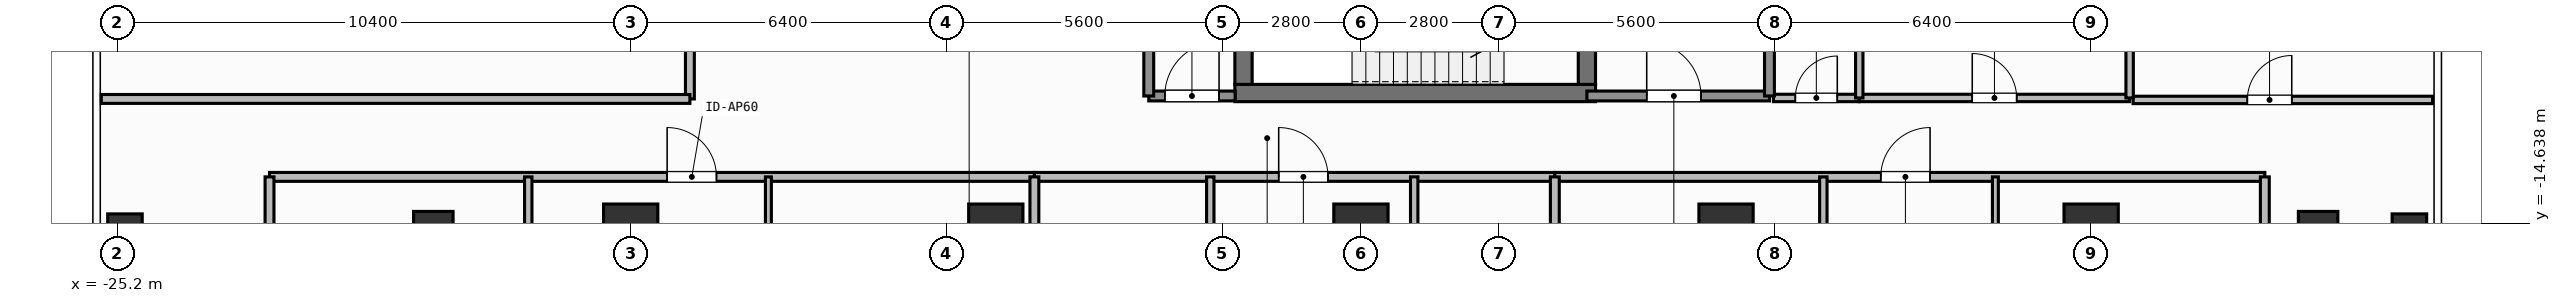
"""IFC4 building model, lengths in metres.
Left out: names, types, materials, properties, quantities, classifications, styles, units other than length and angle.
Written with IfcOpenShell. Run it as: python <this file> out.ifc"""

import sys

from ifc_helpers import new_model, si_unit, direction, frame, frame_2d, origin, origin_2d, place, context, subcontext, project, spatial, rectangle, hollow_rectangle, extrude, element, fill, save


model = new_model("IFC4")
c1 = context("Model", 3, precision=1e-05, world=origin(), true_north=direction((0.0, 1.0)))
c2 = subcontext(c1, "Body", "Model", "MODEL_VIEW")
j1 = project(units=[si_unit("LENGTHUNIT", "METRE"), si_unit("PLANEANGLEUNIT", "RADIAN")], contexts=[c1])
p1 = place(None, origin())
s1 = spatial("IfcSite", under=j1, at=p1, CompositionType="ELEMENT")
p2 = place(p1, origin())
s2 = spatial("IfcBuilding", under=s1, at=p2, CompositionType="ELEMENT")
p3 = place(p2, frame((0.0, 0.0, 183.6)))
s3 = spatial("IfcBuildingStorey", under=s2, at=p3, CompositionType="ELEMENT", Elevation=183.6)
p4 = place(p3, frame((-2.555, -12.0, 0.0), z_axis=(0.0, 0.0, 1.0), x_axis=(1.0, 0.0, 0.0)))
e1 = element("IfcWall", 1, at=p4, inside=s3, PredefinedType="SHEAR", context=c2, shape_type="SweptSolid", body=[
    extrude(rectangle(XDim=7.31, YDim=0.35, at=frame_2d((3.655, 0.0))), origin(), (0.0, 0.0, 1.0), 3.9),
])
p5 = place(p3, frame((-2.38, -11.825, 0.0), z_axis=(0.0, 0.0, 1.0), x_axis=(0.0, 1.0, 0.0)))
e2 = element("IfcWall", 2, at=p5, inside=s3, PredefinedType="SHEAR", context=c2, shape_type="SweptSolid", body=[
    extrude(rectangle(XDim=2.925, YDim=0.35, at=frame_2d((1.462, 0.0))), origin(), (0.0, 0.0, 1.0), 3.9),
])
p6 = place(p3, frame((4.58, -8.9, 0.0), z_axis=(0.0, 0.0, 1.0), x_axis=(0.0, -1.0, 0.0)))
e3 = element("IfcWall", 3, at=p6, inside=s3, PredefinedType="SHEAR", context=c2, shape_type="SweptSolid", body=[
    extrude(rectangle(XDim=2.925, YDim=0.35, at=frame_2d((1.462, 0.0))), origin(), (0.0, 0.0, 1.0), 3.9),
])
p7 = place(p6, frame((0.913, 0.0, 0.0)))
e4 = element("IfcOpeningElement", 4, at=p7, cuts=e3, PredefinedType="OPENING", context=c2, shape_type="SweptSolid", body=[
    extrude(rectangle(XDim=1.1, YDim=2.15, at=frame_2d((0.55, 1.075))), frame((0.0, 0.185, 0.0), z_axis=(0.0, -1.0, 0.0), x_axis=(1.0, 0.0, 0.0)), (0.0, 0.0, 1.0), 0.37),
])
for number, where, z_axis, x_axis in (
    (5, (-14.8, -14.8, 0.0), (0.0, 0.0, 1.0), (1.0, 0.0, 0.0)),
    (6, (-7.4, -14.8, 0.0), (0.0, 0.0, 1.0), (1.0, 0.0, 0.0)),
    (7, (0.0, -14.8, 0.0), (0.0, 0.0, 1.0), (1.0, 0.0, 0.0)),
    (8, (7.4, -14.8, 0.0), (0.0, 0.0, 1.0), (1.0, 0.0, 0.0)),
    (9, (14.8, -14.8, 0.0), (0.0, 0.0, 1.0), (1.0, 0.0, 0.0)),
):
    element("IfcColumn", number, at=place(p3, frame(where, z_axis=z_axis, x_axis=x_axis)), inside=s3, PredefinedType="COLUMN", context=c2, shape_type="SweptSolid", body=[
        extrude(rectangle(XDim=1.1, YDim=1.1, at=origin_2d()), origin(), (0.0, 0.0, 1.0), 3.9),
    ])
for number, where, z_axis, x_axis in (
    (10, (-18.8, -14.8, 0.0), (0.0, 0.0, 1.0), (1.0, 0.0, 0.0)),
    (11, (19.4, -14.8, 0.0), (0.0, 0.0, 1.0), (1.0, 0.0, 0.0)),
):
    element("IfcColumn", number, at=place(p3, frame(where, z_axis=z_axis, x_axis=x_axis)), inside=s3, PredefinedType="COLUMN", context=c2, shape_type="SweptSolid", body=[
        extrude(hollow_rectangle(XDim=0.8, YDim=0.8, WallThickness=0.036, at=origin_2d()), origin(), (0.0, 0.0, 1.0), 3.9),
    ])
for number, where, z_axis, x_axis in (
    (12, (-25.05, -14.8, 0.0), (0.0, 0.0, 1.0), (1.0, 0.0, 0.0)),
    (13, (21.25, -14.8, 0.0), (0.0, 0.0, 1.0), (1.0, 0.0, 0.0)),
):
    element("IfcColumn", number, at=place(p3, frame(where, z_axis=z_axis, x_axis=x_axis)), inside=s3, PredefinedType="COLUMN", context=c2, shape_type="SweptSolid", body=[
        extrude(hollow_rectangle(XDim=0.7, YDim=0.7, WallThickness=0.032, at=origin_2d()), origin(), (0.0, 0.0, 1.0), 3.9),
    ])
p8 = place(p3, frame((4.58, -12.06, 0.0), z_axis=(0.0, 0.0, 1.0), x_axis=(1.0, 0.0, 0.0)))
e14 = element("IfcWall", 14, at=p8, inside=s3, PredefinedType="SOLIDWALL", context=c2, shape_type="SweptSolid", body=[
    extrude(rectangle(XDim=3.7, YDim=0.2, at=frame_2d((1.85, 0.0))), origin(), (0.0, 0.0, 1.0), 3.68),
])
p9 = place(p8, frame((1.212, 0.0, 0.0)))
e15 = element("IfcOpeningElement", 15, at=p9, cuts=e14, PredefinedType="OPENING", context=c2, shape_type="SweptSolid", body=[
    extrude(rectangle(XDim=1.1, YDim=2.15, at=frame_2d((0.55, 1.075))), frame((0.0, 0.11, 0.0), z_axis=(0.0, -1.0, 0.0), x_axis=(1.0, 0.0, 0.0)), (0.0, 0.0, 1.0), 0.22),
])
p10 = place(p3, frame((-4.3, -12.06, 0.0), z_axis=(0.0, 0.0, 1.0), x_axis=(1.0, 0.0, 0.0)))
e16 = element("IfcWall", 16, at=p10, inside=s3, PredefinedType="SOLIDWALL", context=c2, shape_type="SweptSolid", body=[
    extrude(rectangle(XDim=1.75, YDim=0.2, at=frame_2d((0.875, 0.0))), origin(), (0.0, 0.0, 1.0), 3.68),
])
p11 = place(p10, frame((0.325, 0.0, 0.0)))
e17 = element("IfcOpeningElement", 17, at=p11, cuts=e16, PredefinedType="OPENING", context=c2, shape_type="SweptSolid", body=[
    extrude(rectangle(XDim=1.1, YDim=2.15, at=frame_2d((0.55, 1.075))), frame((0.0, 0.11, 0.0), z_axis=(0.0, -1.0, 0.0), x_axis=(1.0, 0.0, 0.0)), (0.0, 0.0, 1.0), 0.22),
])
p12 = place(p3, frame((8.36, -12.1, 0.0), z_axis=(0.0, 0.0, 1.0), x_axis=(1.0, 0.0, 0.0)))
e18 = element("IfcWall", 18, at=p12, inside=s3, PredefinedType="PARTITIONING", context=c2, shape_type="SweptSolid", body=[
    extrude(rectangle(XDim=1.74, YDim=0.15, at=frame_2d((0.87, 0.0))), origin(), (0.0, 0.0, 1.0), 3.68),
])
p13 = place(p12, frame((0.445, 0.0, 0.0)))
e19 = element("IfcOpeningElement", 19, at=p13, cuts=e18, PredefinedType="OPENING", context=c2, shape_type="SweptSolid", body=[
    extrude(rectangle(XDim=0.85, YDim=2.1, at=frame_2d((0.425, 1.05))), frame((0.0, 0.085, 0.0), z_axis=(0.0, -1.0, 0.0), x_axis=(1.0, 0.0, 0.0)), (0.0, 0.0, 1.0), 0.17),
])
p14 = place(p3, frame((10.1, -12.1, 0.0), z_axis=(0.0, 0.0, 1.0), x_axis=(1.0, 0.0, 0.0)))
e20 = element("IfcWall", 20, at=p14, inside=s3, PredefinedType="PARTITIONING", context=c2, shape_type="SweptSolid", body=[
    extrude(rectangle(XDim=5.48, YDim=0.15, at=frame_2d((2.74, 0.0))), origin(), (0.0, 0.0, 1.0), 3.68),
])
p15 = place(p14, frame((2.29, 0.0, 0.0)))
e21 = element("IfcOpeningElement", 21, at=p15, cuts=e20, PredefinedType="OPENING", context=c2, shape_type="SweptSolid", body=[
    extrude(rectangle(XDim=0.9, YDim=2.1, at=frame_2d((0.45, 1.05))), frame((0.0, 0.085, 0.0), z_axis=(0.0, -1.0, 0.0), x_axis=(1.0, 0.0, 0.0)), (0.0, 0.0, 1.0), 0.17),
])
p16 = place(p3, frame((-22.12, -13.7, 0.0), z_axis=(0.0, 0.0, 1.0), x_axis=(1.0, 0.0, 0.0)))
e22 = element("IfcWall", 22, at=p16, inside=s3, PredefinedType="PARTITIONING", context=c2, shape_type="SweptSolid", body=[
    extrude(rectangle(XDim=15.502, YDim=0.18, at=frame_2d((7.751, 0.0))), origin(), (0.0, 0.0, 1.0), 3.68),
])
p17 = place(p16, frame((8.059, 0.0, 0.0)))
e23 = element("IfcOpeningElement", 23, at=p17, cuts=e22, PredefinedType="OPENING", context=c2, shape_type="SweptSolid", body=[
    extrude(rectangle(XDim=1.0, YDim=2.2, at=frame_2d((0.5, 1.1))), frame((0.0, 0.1, 0.0), z_axis=(0.0, -1.0, 0.0), x_axis=(1.0, 0.0, 0.0)), (0.0, 0.0, 1.0), 0.2),
])
p18 = place(p3, frame((-16.876, -19.39, 0.0), z_axis=(0.0, 0.0, 1.0), x_axis=(0.0, 1.0, 0.0)))
e24 = element("IfcWall", 24, at=p18, inside=s3, PredefinedType="PARTITIONING", context=c2, shape_type="SweptSolid", body=[
    extrude(rectangle(XDim=5.69, YDim=0.15, at=frame_2d((2.845, 0.0))), origin(), (0.0, 0.0, 1.0), 3.68),
])
p19 = place(p18, frame((2.42, 0.0, 0.0)))
e25 = element("IfcOpeningElement", 25, at=p19, cuts=e24, PredefinedType="OPENING", context=c2, shape_type="SweptSolid", body=[
    extrude(rectangle(XDim=0.85, YDim=2.1, at=frame_2d((0.425, 1.05))), frame((0.0, 0.085, 0.0), z_axis=(0.0, -1.0, 0.0), x_axis=(1.0, 0.0, 0.0)), (0.0, 0.0, 1.0), 0.17),
])
p20 = place(p3, frame((-12.009, -17.683, 0.0), z_axis=(0.0, 0.0, 1.0), x_axis=(0.0, 1.0, 0.0)))
e26 = element("IfcWall", 26, at=p20, inside=s3, PredefinedType="PARTITIONING", context=c2, shape_type="SweptSolid", body=[
    extrude(rectangle(XDim=3.983, YDim=0.12, at=frame_2d((1.992, 0.0))), origin(), (0.0, 0.0, 1.0), 3.68),
])
p21 = place(p20, frame((1.566, 0.0, 0.0)))
e27 = element("IfcOpeningElement", 27, at=p21, cuts=e26, PredefinedType="OPENING", context=c2, shape_type="SweptSolid", body=[
    extrude(rectangle(XDim=0.85, YDim=2.1, at=frame_2d((0.425, 1.05))), frame((0.0, 0.07, 0.0), z_axis=(0.0, -1.0, 0.0), x_axis=(1.0, 0.0, 0.0)), (0.0, 0.0, 1.0), 0.14),
])
p22 = place(p3, frame((-6.618, -13.7, 0.0), z_axis=(0.0, 0.0, 1.0), x_axis=(1.0, 0.0, 0.0)))
e28 = element("IfcWall", 28, at=p22, inside=s3, PredefinedType="PARTITIONING", context=c2, shape_type="SweptSolid", body=[
    extrude(rectangle(XDim=10.548, YDim=0.18, at=frame_2d((5.274, 0.0))), origin(), (0.0, 0.0, 1.0), 3.68),
])
p23 = place(p22, frame((4.951, 0.0, 0.0)))
e29 = element("IfcOpeningElement", 29, at=p23, cuts=e28, PredefinedType="OPENING", context=c2, shape_type="SweptSolid", body=[
    extrude(rectangle(XDim=1.0, YDim=2.2, at=frame_2d((0.5, 1.1))), frame((0.0, 0.1, 0.0), z_axis=(0.0, -1.0, 0.0), x_axis=(1.0, 0.0, 0.0)), (0.0, 0.0, 1.0), 0.2),
])
p24 = place(p3, frame((-3.053, -19.39, 0.0), z_axis=(0.0, 0.0, 1.0), x_axis=(0.0, 1.0, 0.0)))
e30 = element("IfcWall", 30, at=p24, inside=s3, PredefinedType="PARTITIONING", context=c2, shape_type="SweptSolid", body=[
    extrude(rectangle(XDim=5.69, YDim=0.15, at=frame_2d((2.845, 0.0))), origin(), (0.0, 0.0, 1.0), 3.68),
])
p25 = place(p24, frame((2.42, 0.0, 0.0)))
e31 = element("IfcOpeningElement", 31, at=p25, cuts=e30, PredefinedType="OPENING", context=c2, shape_type="SweptSolid", body=[
    extrude(rectangle(XDim=0.85, YDim=2.1, at=frame_2d((0.425, 1.05))), frame((0.0, 0.085, 0.0), z_axis=(0.0, -1.0, 0.0), x_axis=(1.0, 0.0, 0.0)), (0.0, 0.0, 1.0), 0.17),
])
p26 = place(p3, frame((1.08, -19.39, 0.0), z_axis=(0.0, 0.0, 1.0), x_axis=(0.0, 1.0, 0.0)))
e32 = element("IfcWall", 32, at=p26, inside=s3, PredefinedType="PARTITIONING", context=c2, shape_type="SweptSolid", body=[
    extrude(rectangle(XDim=5.69, YDim=0.15, at=frame_2d((2.845, 0.0))), origin(), (0.0, 0.0, 1.0), 3.68),
])
p27 = place(p26, frame((2.42, 0.0, 0.0)))
e33 = element("IfcOpeningElement", 33, at=p27, cuts=e32, PredefinedType="OPENING", context=c2, shape_type="SweptSolid", body=[
    extrude(rectangle(XDim=0.85, YDim=2.1, at=frame_2d((0.425, 1.05))), frame((0.0, 0.085, 0.0), z_axis=(0.0, -1.0, 0.0), x_axis=(1.0, 0.0, 0.0)), (0.0, 0.0, 1.0), 0.17),
])
p28 = place(p3, frame((3.93, -13.7, 0.0), z_axis=(0.0, 0.0, 1.0), x_axis=(1.0, 0.0, 0.0)))
e34 = element("IfcWall", 34, at=p28, inside=s3, PredefinedType="PARTITIONING", context=c2, shape_type="SweptSolid", body=[
    extrude(rectangle(XDim=14.39, YDim=0.18, at=frame_2d((7.195, 0.0))), origin(), (0.0, 0.0, 1.0), 3.68),
])
p29 = place(p28, frame((6.605, 0.0, 0.0)))
e35 = element("IfcOpeningElement", 35, at=p29, cuts=e34, PredefinedType="OPENING", context=c2, shape_type="SweptSolid", body=[
    extrude(rectangle(XDim=1.0, YDim=2.2, at=frame_2d((0.5, 1.1))), frame((0.0, 0.1, 0.0), z_axis=(0.0, -1.0, 0.0), x_axis=(1.0, 0.0, 0.0)), (0.0, 0.0, 1.0), 0.2),
])
p30 = place(p3, frame((9.372, -19.39, 0.0), z_axis=(0.0, 0.0, 1.0), x_axis=(0.0, 1.0, 0.0)))
e36 = element("IfcWall", 36, at=p30, inside=s3, PredefinedType="PARTITIONING", context=c2, shape_type="SweptSolid", body=[
    extrude(rectangle(XDim=5.69, YDim=0.15, at=frame_2d((2.845, 0.0))), origin(), (0.0, 0.0, 1.0), 3.68),
])
p31 = place(p30, frame((2.42, 0.0, 0.0)))
e37 = element("IfcOpeningElement", 37, at=p31, cuts=e36, PredefinedType="OPENING", context=c2, shape_type="SweptSolid", body=[
    extrude(rectangle(XDim=0.85, YDim=2.1, at=frame_2d((0.425, 1.05))), frame((0.0, 0.085, 0.0), z_axis=(0.0, -1.0, 0.0), x_axis=(1.0, 0.0, 0.0)), (0.0, 0.0, 1.0), 0.17),
])
p32 = place(p3, frame((12.859, -17.683, 0.0), z_axis=(0.0, 0.0, 1.0), x_axis=(0.0, 1.0, 0.0)))
e38 = element("IfcWall", 38, at=p32, inside=s3, PredefinedType="PARTITIONING", context=c2, shape_type="SweptSolid", body=[
    extrude(rectangle(XDim=3.983, YDim=0.12, at=frame_2d((1.992, 0.0))), origin(), (0.0, 0.0, 1.0), 3.68),
])
p33 = place(p32, frame((1.391, 0.0, 0.0)))
e39 = element("IfcOpeningElement", 39, at=p33, cuts=e38, PredefinedType="OPENING", context=c2, shape_type="SweptSolid", body=[
    extrude(rectangle(XDim=0.85, YDim=2.1, at=frame_2d((0.425, 1.05))), frame((0.0, 0.07, 0.0), z_axis=(0.0, -1.0, 0.0), x_axis=(1.0, 0.0, 0.0)), (0.0, 0.0, 1.0), 0.14),
])
p34 = place(p3, frame((-13.6, -12.12, 0.0), z_axis=(0.0, 0.0, 1.0), x_axis=(0.0, 1.0, 0.0)))
e40 = element("IfcWall", 40, at=p34, inside=s3, PredefinedType="PARTITIONING", context=c2, shape_type="SweptSolid", body=[
    extrude(rectangle(XDim=6.771, YDim=0.18, at=frame_2d((3.385, 0.0))), origin(), (0.0, 0.0, 1.0), 3.68),
])
p35 = place(p34, frame((1.215, 0.0, 0.0)))
e41 = element("IfcOpeningElement", 41, at=p35, cuts=e40, PredefinedType="OPENING", context=c2, shape_type="SweptSolid", body=[
    extrude(rectangle(XDim=1.0, YDim=2.2, at=frame_2d((0.5, 1.1))), frame((0.0, 0.1, 0.0), z_axis=(0.0, -1.0, 0.0), x_axis=(1.0, 0.0, 0.0)), (0.0, 0.0, 1.0), 0.2),
])
p36 = place(p3, frame((15.65, -12.14, 0.0), z_axis=(0.0, 0.0, 1.0), x_axis=(1.0, 0.0, 0.0)))
e42 = element("IfcWall", 42, at=p36, inside=s3, PredefinedType="PARTITIONING", context=c2, shape_type="SweptSolid", body=[
    extrude(rectangle(XDim=6.07, YDim=0.15, at=frame_2d((3.035, 0.0))), origin(), (0.0, 0.0, 1.0), 3.68),
])
p37 = place(p36, frame((2.316, 0.0, 0.0)))
e43 = element("IfcOpeningElement", 43, at=p37, cuts=e42, PredefinedType="OPENING", context=c2, shape_type="SweptSolid", body=[
    extrude(rectangle(XDim=0.9, YDim=2.1, at=frame_2d((0.45, 1.05))), frame((0.0, 0.085, 0.0), z_axis=(0.0, -1.0, 0.0), x_axis=(1.0, 0.0, 0.0)), (0.0, 0.0, 1.0), 0.17),
])
for number, where, z_axis, x_axis in (
    (44, (8.28, -12.06, 0.0), (0.0, 0.0, 1.0), (0.0, 1.0, 0.0)),
    (45, (-4.3, -12.06, 0.0), (0.0, 0.0, 1.0), (0.0, 1.0, 0.0)),
):
    element("IfcWall", number, at=place(p3, frame(where, z_axis=z_axis, x_axis=x_axis)), inside=s3, PredefinedType="SOLIDWALL", context=c2, shape_type="SweptSolid", body=[
        extrude(rectangle(XDim=3.26, YDim=0.2, at=frame_2d((1.63, 0.0))), origin(), (0.0, 0.0, 1.0), 3.68),
    ])
p38 = place(p3, frame((10.1, -12.1, 0.0), z_axis=(0.0, 0.0, 1.0), x_axis=(0.0, 1.0, 0.0)))
e46 = element("IfcWall", 46, at=p38, inside=s3, PredefinedType="PARTITIONING", context=c2, shape_type="SweptSolid", body=[
    extrude(rectangle(XDim=2.35, YDim=0.15, at=frame_2d((1.175, 0.0))), origin(), (0.0, 0.0, 1.0), 3.68),
])
p39 = place(p3, frame((15.58, -12.1, 0.0), z_axis=(0.0, 0.0, 1.0), x_axis=(0.0, 1.0, 0.0)))
e47 = element("IfcWall", 47, at=p39, inside=s3, PredefinedType="PARTITIONING", context=c2, shape_type="SweptSolid", body=[
    extrude(rectangle(XDim=6.25, YDim=0.15, at=frame_2d((3.125, 0.0))), origin(), (0.0, 0.0, 1.0), 3.68),
])
for number, where, z_axis, x_axis in (
    (48, (-22.12, -22.51, 0.0), (0.0, 0.0, 1.0), (0.0, 1.0, 0.0)),
    (49, (18.32, -22.51, 0.0), (0.0, 0.0, 1.0), (0.0, 1.0, 0.0)),
):
    element("IfcWall", number, at=place(p3, frame(where, z_axis=z_axis, x_axis=x_axis)), inside=s3, PredefinedType="PARTITIONING", context=c2, shape_type="SweptSolid", body=[
        extrude(rectangle(XDim=8.81, YDim=0.18, at=frame_2d((4.405, 0.0))), origin(), (0.0, 0.0, 1.0), 3.68),
    ])
for number, where, z_axis, x_axis in (
    (50, (-6.618, -23.63, 0.0), (0.0, 0.0, 1.0), (0.0, 1.0, 0.0)),
    (51, (3.93, -23.63, 0.0), (0.0, 0.0, 1.0), (0.0, 1.0, 0.0)),
):
    element("IfcWall", number, at=place(p3, frame(where, z_axis=z_axis, x_axis=x_axis)), inside=s3, PredefinedType="PARTITIONING", context=c2, shape_type="SweptSolid", body=[
        extrude(rectangle(XDim=9.93, YDim=0.18, at=frame_2d((4.965, 0.0))), origin(), (0.0, 0.0, 1.0), 3.68),
    ])
p40 = place(p3, frame((-25.53, -12.12, 0.0), z_axis=(0.0, 0.0, 1.0), x_axis=(1.0, 0.0, 0.0)))
e52 = element("IfcWall", 52, at=p40, inside=s3, PredefinedType="PARTITIONING", context=c2, shape_type="SweptSolid", body=[
    extrude(rectangle(XDim=11.93, YDim=0.18, at=frame_2d((5.965, 0.0))), origin(), (0.0, 0.0, 1.0), 3.68),
])
p41 = place(p9, origin())
e53 = element("IfcDoor", 53, at=p41, inside=s3, OperationType="SINGLE_SWING_LEFT", PredefinedType="DOOR", context=c2, shape_type="SweptSolid", body=[
    extrude(rectangle(XDim=1.1, YDim=2.15, at=frame_2d((0.55, 1.075))), frame((0.0, 0.025, 0.0), z_axis=(0.0, -1.0, 0.0), x_axis=(1.0, 0.0, 0.0)), (0.0, 0.0, 1.0), 0.05),
])
fill(e15, e53)
p42 = place(p11, origin())
e54 = element("IfcDoor", 54, at=p42, inside=s3, OperationType="SINGLE_SWING_RIGHT", PredefinedType="DOOR", context=c2, shape_type="SweptSolid", body=[
    extrude(rectangle(XDim=1.1, YDim=2.15, at=frame_2d((0.55, 1.075))), frame((0.0, 0.025, 0.0), z_axis=(0.0, -1.0, 0.0), x_axis=(1.0, 0.0, 0.0)), (0.0, 0.0, 1.0), 0.05),
])
fill(e17, e54)
p43 = place(p13, origin())
e55 = element("IfcDoor", 55, at=p43, inside=s3, OperationType="SINGLE_SWING_RIGHT", PredefinedType="DOOR", context=c2, shape_type="SweptSolid", body=[
    extrude(rectangle(XDim=0.85, YDim=2.1, at=frame_2d((0.425, 1.05))), frame((0.0, 0.025, 0.0), z_axis=(0.0, -1.0, 0.0), x_axis=(1.0, 0.0, 0.0)), (0.0, 0.0, 1.0), 0.05),
])
fill(e19, e55)
p44 = place(p15, origin())
e56 = element("IfcDoor", 56, at=p44, inside=s3, OperationType="SINGLE_SWING_LEFT", PredefinedType="DOOR", context=c2, shape_type="SweptSolid", body=[
    extrude(rectangle(XDim=0.9, YDim=2.1, at=frame_2d((0.45, 1.05))), frame((0.0, 0.025, 0.0), z_axis=(0.0, -1.0, 0.0), x_axis=(1.0, 0.0, 0.0)), (0.0, 0.0, 1.0), 0.05),
])
fill(e21, e56)
p45 = place(p17, origin())
e57 = element("IfcDoor", 57, at=p45, inside=s3, OperationType="SINGLE_SWING_LEFT", PredefinedType="DOOR", context=c2, shape_type="SweptSolid", body=[
    extrude(rectangle(XDim=1.0, YDim=2.2, at=frame_2d((0.5, 1.1))), frame((0.0, 0.025, 0.0), z_axis=(0.0, -1.0, 0.0), x_axis=(1.0, 0.0, 0.0)), (0.0, 0.0, 1.0), 0.05),
])
fill(e23, e57)
p46 = place(p23, origin())
e58 = element("IfcDoor", 58, at=p46, inside=s3, OperationType="SINGLE_SWING_LEFT", PredefinedType="DOOR", context=c2, shape_type="SweptSolid", body=[
    extrude(rectangle(XDim=1.0, YDim=2.2, at=frame_2d((0.5, 1.1))), frame((0.0, 0.025, 0.0), z_axis=(0.0, -1.0, 0.0), x_axis=(1.0, 0.0, 0.0)), (0.0, 0.0, 1.0), 0.05),
])
fill(e29, e58)
p47 = place(p29, origin())
e59 = element("IfcDoor", 59, at=p47, inside=s3, OperationType="SINGLE_SWING_RIGHT", PredefinedType="DOOR", context=c2, shape_type="SweptSolid", body=[
    extrude(rectangle(XDim=1.0, YDim=2.2, at=frame_2d((0.5, 1.1))), frame((0.0, 0.025, 0.0), z_axis=(0.0, -1.0, 0.0), x_axis=(1.0, 0.0, 0.0)), (0.0, 0.0, 1.0), 0.05),
])
fill(e35, e59)
p48 = place(p37, origin())
e60 = element("IfcDoor", 60, at=p48, inside=s3, OperationType="SINGLE_SWING_RIGHT", PredefinedType="DOOR", context=c2, shape_type="SweptSolid", body=[
    extrude(rectangle(XDim=0.9, YDim=2.1, at=frame_2d((0.45, 1.05))), frame((0.0, 0.025, 0.0), z_axis=(0.0, -1.0, 0.0), x_axis=(1.0, 0.0, 0.0)), (0.0, 0.0, 1.0), 0.05),
])
fill(e43, e60)
save(model, sys.argv[1])
